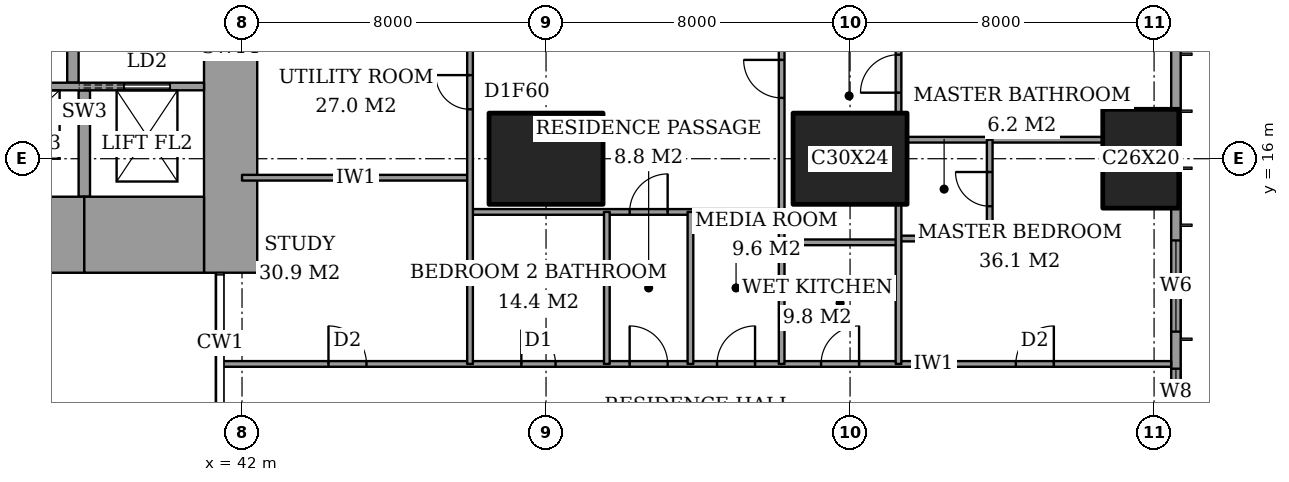
"""IFC4 building model, lengths in metres.
Left out: names, types, materials, properties, quantities, classifications, styles, units other than length and angle.
Written with IfcOpenShell. Run it as: python <this file> out.ifc"""

import sys

from ifc_helpers import new_model, si_unit, direction, frame, frame_2d, origin, origin_2d, place, context, subcontext, project, spatial, rectangle, extrude, element, fill, save


model = new_model("IFC4")
c1 = context("Model", 3, precision=1e-05, world=origin(), true_north=direction((0.0, 1.0)))
c2 = subcontext(c1, "Body", "Model", "MODEL_VIEW")
j1 = project(units=[si_unit("LENGTHUNIT", "METRE"), si_unit("PLANEANGLEUNIT", "RADIAN")], contexts=[c1])
p1 = place(None, origin())
s1 = spatial("IfcSite", under=j1, at=p1, CompositionType="ELEMENT")
p2 = place(p1, origin())
s2 = spatial("IfcBuilding", under=s1, at=p2, CompositionType="ELEMENT")
p3 = place(p2, frame((0.0, 0.0, 40.4)))
s3 = spatial("IfcBuildingStorey", under=s2, at=p3, CompositionType="ELEMENT", Elevation=40.4)
for number, where, z_axis, x_axis in (
    (1, (50.0, 16.0, 0.0), (0.0, 0.0, 1.0), (1.0, 0.0, 0.0)),
    (2, (58.0, 16.0, 0.0), (0.0, 0.0, 1.0), (1.0, 0.0, 0.0)),
):
    element("IfcColumn", number, at=place(p3, frame(where, z_axis=z_axis, x_axis=x_axis)), inside=s3, PredefinedType="COLUMN", context=c2, shape_type="SweptSolid", body=[
        extrude(rectangle(XDim=3.0, YDim=2.4, at=origin_2d()), origin(), (0.0, 0.0, 1.0), 3.6),
    ])
p4 = place(p3, frame((65.65, 16.0, 0.0), z_axis=(0.0, 0.0, 1.0), x_axis=(0.0, 1.0, 0.0)))
e3 = element("IfcColumn", 3, at=p4, inside=s3, PredefinedType="COLUMN", context=c2, shape_type="SweptSolid", body=[
    extrude(rectangle(XDim=2.6, YDim=2.0, at=origin_2d()), origin(), (0.0, 0.0, 1.0), 3.6),
])
p5 = place(p3, frame((28.15, 14.0, 0.0), z_axis=(0.0, 0.0, 1.0), x_axis=(1.0, 0.0, 0.0)))
e4 = element("IfcWall", 4, at=p5, inside=s3, PredefinedType="SHEAR", context=c2, shape_type="SweptSolid", body=[
    extrude(rectangle(XDim=9.7, YDim=2.0, at=frame_2d((4.85, 0.0))), origin(), (0.0, 0.0, 1.0), 3.6),
])
p6 = place(p3, frame((37.85, 14.0, 0.0), z_axis=(0.0, 0.0, 1.0), x_axis=(1.0, 0.0, 0.0)))
e5 = element("IfcWall", 5, at=p6, inside=s3, PredefinedType="SHEAR", context=c2, shape_type="SweptSolid", body=[
    extrude(rectangle(XDim=3.15, YDim=2.0, at=frame_2d((1.575, 0.0))), origin(), (0.0, 0.0, 1.0), 3.6),
])
p7 = place(p3, frame((41.7, 13.0, 0.0), z_axis=(0.0, 0.0, 1.0), x_axis=(0.0, 1.0, 0.0)))
e6 = element("IfcWall", 6, at=p7, inside=s3, PredefinedType="SHEAR", context=c2, shape_type="SweptSolid", body=[
    extrude(rectangle(XDim=11.85, YDim=1.4, at=frame_2d((5.925, 0.0))), origin(), (0.0, 0.0, 1.0), 3.6),
])
p8 = place(p7, frame((7.5, 0.0, 0.0)))
e7 = element("IfcOpeningElement", 7, at=p8, cuts=e6, PredefinedType="OPENING", context=c2, shape_type="SweptSolid", body=[
    extrude(rectangle(XDim=1.8, YDim=2.4, at=frame_2d((0.9, 1.2))), frame((0.0, 0.71, 0.0), z_axis=(0.0, -1.0, 0.0), x_axis=(1.0, 0.0, 0.0)), (0.0, 0.0, 1.0), 1.42),
])
p9 = place(p3, frame((37.55, 18.0, 0.0), z_axis=(0.0, 0.0, 1.0), x_axis=(0.0, 1.0, 0.0)))
e8 = element("IfcWall", 8, at=p9, inside=s3, PredefinedType="PARTITIONING", context=c2, shape_type="SweptSolid", body=[
    extrude(rectangle(XDim=6.7, YDim=0.3, at=frame_2d((3.35, 0.0))), origin(), (0.0, 0.0, 1.0), 3.6),
])
p10 = place(p9, frame((2.8, 0.0, 0.0)))
e9 = element("IfcOpeningElement", 9, at=p10, cuts=e8, PredefinedType="OPENING", context=c2, shape_type="SweptSolid", body=[
    extrude(rectangle(XDim=1.2, YDim=2.1, at=frame_2d((0.6, 1.05))), frame((0.0, 0.16, 0.0), z_axis=(0.0, -1.0, 0.0), x_axis=(1.0, 0.0, 0.0)), (0.0, 0.0, 1.0), 0.32),
])
p11 = place(p3, frame((66.575, 3.175, 0.0), z_axis=(0.0, 0.0, 1.0), x_axis=(0.0, 1.0, 0.0)))
e10 = element("IfcWall", 10, at=p11, inside=s3, PredefinedType="SOLIDWALL", context=c2, shape_type="SweptSolid", body=[
    extrude(rectangle(XDim=41.65, YDim=0.25, at=frame_2d((20.825, 0.0))), origin(), (0.0, 0.0, 1.0), 3.6),
])
p12 = place(p11, frame((0.775, 0.0, 0.6)))
e11 = element("IfcOpeningElement", 11, at=p12, cuts=e10, PredefinedType="OPENING", context=c2, shape_type="SweptSolid", body=[
    extrude(rectangle(XDim=2.4, YDim=2.0, at=frame_2d((1.2, 1.0))), frame((0.0, 0.135, 0.0), z_axis=(0.0, -1.0, 0.0), x_axis=(1.0, 0.0, 0.0)), (0.0, 0.0, 1.0), 0.27),
])
p13 = place(p11, frame((6.1, 0.0, 0.6)))
e12 = element("IfcOpeningElement", 12, at=p13, cuts=e10, PredefinedType="OPENING", context=c2, shape_type="SweptSolid", body=[
    extrude(rectangle(XDim=1.2, YDim=2.0, at=frame_2d((0.6, 1.0))), frame((0.0, 0.135, 0.0), z_axis=(0.0, -1.0, 0.0), x_axis=(1.0, 0.0, 0.0)), (0.0, 0.0, 1.0), 0.27),
])
p14 = place(p11, frame((8.275, 0.0, 0.6)))
e13 = element("IfcOpeningElement", 13, at=p14, cuts=e10, PredefinedType="OPENING", context=c2, shape_type="SweptSolid", body=[
    extrude(rectangle(XDim=2.4, YDim=2.0, at=frame_2d((1.2, 1.0))), frame((0.0, 0.135, 0.0), z_axis=(0.0, -1.0, 0.0), x_axis=(1.0, 0.0, 0.0)), (0.0, 0.0, 1.0), 0.27),
])
p15 = place(p11, frame((15.775, 0.0, 0.6)))
e14 = element("IfcOpeningElement", 14, at=p15, cuts=e10, PredefinedType="OPENING", context=c2, shape_type="SweptSolid", body=[
    extrude(rectangle(XDim=2.4, YDim=2.0, at=frame_2d((1.2, 1.0))), frame((0.0, 0.135, 0.0), z_axis=(0.0, -1.0, 0.0), x_axis=(1.0, 0.0, 0.0)), (0.0, 0.0, 1.0), 0.27),
])
p16 = place(p11, frame((23.475, 0.0, 0.6)))
e15 = element("IfcOpeningElement", 15, at=p16, cuts=e10, PredefinedType="OPENING", context=c2, shape_type="SweptSolid", body=[
    extrude(rectangle(XDim=2.4, YDim=2.0, at=frame_2d((1.2, 1.0))), frame((0.0, 0.135, 0.0), z_axis=(0.0, -1.0, 0.0), x_axis=(1.0, 0.0, 0.0)), (0.0, 0.0, 1.0), 0.27),
])
p17 = place(p11, frame((30.975, 0.0, 0.6)))
e16 = element("IfcOpeningElement", 16, at=p17, cuts=e10, PredefinedType="OPENING", context=c2, shape_type="SweptSolid", body=[
    extrude(rectangle(XDim=2.4, YDim=2.0, at=frame_2d((1.2, 1.0))), frame((0.0, 0.135, 0.0), z_axis=(0.0, -1.0, 0.0), x_axis=(1.0, 0.0, 0.0)), (0.0, 0.0, 1.0), 0.27),
])
p18 = place(p11, frame((34.5, 0.0, 0.6)))
e17 = element("IfcOpeningElement", 17, at=p18, cuts=e10, PredefinedType="OPENING", context=c2, shape_type="SweptSolid", body=[
    extrude(rectangle(XDim=1.2, YDim=2.0, at=frame_2d((0.6, 1.0))), frame((0.0, 0.135, 0.0), z_axis=(0.0, -1.0, 0.0), x_axis=(1.0, 0.0, 0.0)), (0.0, 0.0, 1.0), 0.27),
])
p19 = place(p11, frame((38.475, 0.0, 0.6)))
e18 = element("IfcOpeningElement", 18, at=p19, cuts=e10, PredefinedType="OPENING", context=c2, shape_type="SweptSolid", body=[
    extrude(rectangle(XDim=2.4, YDim=2.0, at=frame_2d((1.2, 1.0))), frame((0.0, 0.135, 0.0), z_axis=(0.0, -1.0, 0.0), x_axis=(1.0, 0.0, 0.0)), (0.0, 0.0, 1.0), 0.27),
])
p20 = place(p3, frame((41.439, 10.6, 0.0), z_axis=(0.0, 0.0, 1.0), x_axis=(1.0, 0.0, 0.0)))
e19 = element("IfcWall", 19, at=p20, inside=s3, PredefinedType="PARTITIONING", context=c2, shape_type="SweptSolid", body=[
    extrude(rectangle(XDim=25.011, YDim=0.15, at=frame_2d((12.505, 0.0))), origin(), (0.0, 0.0, 1.0), 3.35),
])
p21 = place(p20, frame((10.761, 0.0, 0.0)))
e20 = element("IfcOpeningElement", 20, at=p21, cuts=e19, PredefinedType="OPENING", context=c2, shape_type="SweptSolid", body=[
    extrude(rectangle(XDim=1.0, YDim=2.1, at=frame_2d((0.5, 1.05))), frame((0.0, 0.085, 0.0), z_axis=(0.0, -1.0, 0.0), x_axis=(1.0, 0.0, 0.0)), (0.0, 0.0, 1.0), 0.17),
])
p22 = place(p20, frame((20.924, 0.0, 0.0)))
e21 = element("IfcOpeningElement", 21, at=p22, cuts=e19, PredefinedType="OPENING", context=c2, shape_type="SweptSolid", body=[
    extrude(rectangle(XDim=1.0, YDim=2.1, at=frame_2d((0.5, 1.05))), frame((0.0, 0.085, 0.0), z_axis=(0.0, -1.0, 0.0), x_axis=(1.0, 0.0, 0.0)), (0.0, 0.0, 1.0), 0.17),
])
p23 = place(p20, frame((15.799, 0.0, 0.0)))
e22 = element("IfcOpeningElement", 22, at=p23, cuts=e19, PredefinedType="OPENING", context=c2, shape_type="SweptSolid", body=[
    extrude(rectangle(XDim=1.0, YDim=2.1, at=frame_2d((0.5, 1.05))), frame((0.0, 0.085, 0.0), z_axis=(0.0, -1.0, 0.0), x_axis=(1.0, 0.0, 0.0)), (0.0, 0.0, 1.0), 0.17),
])
p24 = place(p20, frame((13.061, 0.0, 0.0)))
e23 = element("IfcOpeningElement", 23, at=p24, cuts=e19, PredefinedType="OPENING", context=c2, shape_type="SweptSolid", body=[
    extrude(rectangle(XDim=1.0, YDim=2.1, at=frame_2d((0.5, 1.05))), frame((0.0, 0.085, 0.0), z_axis=(0.0, -1.0, 0.0), x_axis=(1.0, 0.0, 0.0)), (0.0, 0.0, 1.0), 0.17),
])
p25 = place(p20, frame((7.911, 0.0, 0.0)))
e24 = element("IfcOpeningElement", 24, at=p25, cuts=e19, PredefinedType="OPENING", context=c2, shape_type="SweptSolid", body=[
    extrude(rectangle(XDim=0.9, YDim=2.1, at=frame_2d((0.45, 1.05))), frame((0.0, 0.085, 0.0), z_axis=(0.0, -1.0, 0.0), x_axis=(1.0, 0.0, 0.0)), (0.0, 0.0, 1.0), 0.17),
])
p26 = place(p20, frame((2.836, 0.0, 0.0)))
e25 = element("IfcOpeningElement", 25, at=p26, cuts=e19, PredefinedType="OPENING", context=c2, shape_type="SweptSolid", body=[
    extrude(rectangle(XDim=1.0, YDim=2.1, at=frame_2d((0.5, 1.05))), frame((0.0, 0.085, 0.0), z_axis=(0.0, -1.0, 0.0), x_axis=(1.0, 0.0, 0.0)), (0.0, 0.0, 1.0), 0.17),
])
p27 = place(p3, frame((56.2, 13.8, 0.0), z_axis=(0.0, 0.0, 1.0), x_axis=(1.0, 0.0, 0.0)))
e26 = element("IfcWall", 26, at=p27, inside=s3, PredefinedType="PARTITIONING", context=c2, shape_type="SweptSolid", body=[
    extrude(rectangle(XDim=3.075, YDim=0.15, at=frame_2d((1.538, 0.0))), origin(), (0.0, 0.0, 1.0), 3.35),
])
p28 = place(p3, frame((59.275, 13.9, 0.0), z_axis=(0.0, 0.0, 1.0), x_axis=(1.0, 0.0, 0.0)))
e27 = element("IfcWall", 27, at=p28, inside=s3, PredefinedType="PARTITIONING", context=c2, shape_type="SweptSolid", body=[
    extrude(rectangle(XDim=2.4, YDim=0.15, at=frame_2d((1.2, 0.0))), origin(), (0.0, 0.0, 1.0), 3.35),
])
p29 = place(p3, frame((48.0, 14.6, 0.0), z_axis=(0.0, 0.0, 1.0), x_axis=(1.0, 0.0, 0.0)))
e28 = element("IfcWall", 28, at=p29, inside=s3, PredefinedType="PARTITIONING", context=c2, shape_type="SweptSolid", body=[
    extrude(rectangle(XDim=8.2, YDim=0.15, at=frame_2d((4.1, 0.0))), origin(), (0.0, 0.0, 1.0), 3.35),
])
p30 = place(p29, frame((4.2, 0.0, 0.0)))
e29 = element("IfcOpeningElement", 29, at=p30, cuts=e28, PredefinedType="OPENING", context=c2, shape_type="SweptSolid", body=[
    extrude(rectangle(XDim=1.0, YDim=2.1, at=frame_2d((0.5, 1.05))), frame((0.0, 0.085, 0.0), z_axis=(0.0, -1.0, 0.0), x_axis=(1.0, 0.0, 0.0)), (0.0, 0.0, 1.0), 0.17),
])
p31 = place(p3, frame((42.0, 15.5, 0.0), z_axis=(0.0, 0.0, 1.0), x_axis=(1.0, 0.0, 0.0)))
e30 = element("IfcWall", 30, at=p31, inside=s3, PredefinedType="PARTITIONING", context=c2, shape_type="SweptSolid", body=[
    extrude(rectangle(XDim=6.0, YDim=0.15, at=frame_2d((3.0, 0.0))), origin(), (0.0, 0.0, 1.0), 3.35),
])
p32 = place(p3, frame((59.5, 16.5, 0.0), z_axis=(0.0, 0.0, 1.0), x_axis=(1.0, 0.0, 0.0)))
e31 = element("IfcWall", 31, at=p32, inside=s3, PredefinedType="PARTITIONING", context=c2, shape_type="SweptSolid", body=[
    extrude(rectangle(XDim=5.15, YDim=0.15, at=frame_2d((2.575, 0.0))), origin(), (0.0, 0.0, 1.0), 3.35),
])
p33 = place(p3, frame((48.0, 10.6, 0.0), z_axis=(0.0, 0.0, 1.0), x_axis=(0.0, 1.0, 0.0)))
e32 = element("IfcWall", 32, at=p33, inside=s3, PredefinedType="PARTITIONING", context=c2, shape_type="SweptSolid", body=[
    extrude(rectangle(XDim=13.4, YDim=0.15, at=frame_2d((6.7, 0.0))), origin(), (0.0, 0.0, 1.0), 3.35),
])
p34 = place(p33, frame((10.8, 0.0, 0.0)))
e33 = element("IfcOpeningElement", 33, at=p34, cuts=e32, PredefinedType="OPENING", context=c2, shape_type="SweptSolid", body=[
    extrude(rectangle(XDim=1.2, YDim=2.4, at=frame_2d((0.6, 1.2))), frame((0.0, 0.085, 0.0), z_axis=(0.0, -1.0, 0.0), x_axis=(1.0, 0.0, 0.0)), (0.0, 0.0, 1.0), 0.17),
])
p35 = place(p33, frame((6.7, 0.0, 0.0)))
e34 = element("IfcOpeningElement", 34, at=p35, cuts=e32, PredefinedType="OPENING", context=c2, shape_type="SweptSolid", body=[
    extrude(rectangle(XDim=0.9, YDim=2.1, at=frame_2d((0.45, 1.05))), frame((0.0, 0.085, 0.0), z_axis=(0.0, -1.0, 0.0), x_axis=(1.0, 0.0, 0.0)), (0.0, 0.0, 1.0), 0.17),
])
for number, where, z_axis, x_axis in (
    (35, (51.6, 10.6, 0.0), (0.0, 0.0, 1.0), (0.0, 1.0, 0.0)),
    (36, (53.8, 10.6, 0.0), (0.0, 0.0, 1.0), (0.0, 1.0, 0.0)),
):
    element("IfcWall", number, at=place(p3, frame(where, z_axis=z_axis, x_axis=x_axis)), inside=s3, PredefinedType="PARTITIONING", context=c2, shape_type="SweptSolid", body=[
        extrude(rectangle(XDim=4.0, YDim=0.15, at=frame_2d((2.0, 0.0))), origin(), (0.0, 0.0, 1.0), 3.35),
    ])
p36 = place(p3, frame((56.2, 10.6, 0.0), z_axis=(0.0, 0.0, 1.0), x_axis=(0.0, 1.0, 0.0)))
e37 = element("IfcWall", 37, at=p36, inside=s3, PredefinedType="PARTITIONING", context=c2, shape_type="SweptSolid", body=[
    extrude(rectangle(XDim=11.0, YDim=0.15, at=frame_2d((5.5, 0.0))), origin(), (0.0, 0.0, 1.0), 3.35),
])
p37 = place(p36, frame((7.0, 0.0, 0.0)))
e38 = element("IfcOpeningElement", 38, at=p37, cuts=e37, PredefinedType="OPENING", context=c2, shape_type="SweptSolid", body=[
    extrude(rectangle(XDim=1.0, YDim=2.1, at=frame_2d((0.5, 1.05))), frame((0.0, 0.085, 0.0), z_axis=(0.0, -1.0, 0.0), x_axis=(1.0, 0.0, 0.0)), (0.0, 0.0, 1.0), 0.17),
])
p38 = place(p3, frame((59.275, 10.6, 0.0), z_axis=(0.0, 0.0, 1.0), x_axis=(0.0, 1.0, 0.0)))
e39 = element("IfcWall", 39, at=p38, inside=s3, PredefinedType="PARTITIONING", context=c2, shape_type="SweptSolid", body=[
    extrude(rectangle(XDim=4.2, YDim=0.15, at=frame_2d((2.1, 0.0))), origin(), (0.0, 0.0, 1.0), 3.35),
])
p39 = place(p3, frame((59.275, 17.2, 0.0), z_axis=(0.0, 0.0, 1.0), x_axis=(0.0, 1.0, 0.0)))
e40 = element("IfcWall", 40, at=p39, inside=s3, PredefinedType="PARTITIONING", context=c2, shape_type="SweptSolid", body=[
    extrude(rectangle(XDim=2.45, YDim=0.15, at=frame_2d((1.225, 0.0))), origin(), (0.0, 0.0, 1.0), 3.35),
])
p40 = place(p39, frame((0.538, 0.0, 0.0)))
e41 = element("IfcOpeningElement", 41, at=p40, cuts=e40, PredefinedType="OPENING", context=c2, shape_type="SweptSolid", body=[
    extrude(rectangle(XDim=1.0, YDim=2.1, at=frame_2d((0.5, 1.05))), frame((0.0, 0.085, 0.0), z_axis=(0.0, -1.0, 0.0), x_axis=(1.0, 0.0, 0.0)), (0.0, 0.0, 1.0), 0.17),
])
p41 = place(p3, frame((61.675, 13.9, 0.0), z_axis=(0.0, 0.0, 1.0), x_axis=(0.0, 1.0, 0.0)))
e42 = element("IfcWall", 42, at=p41, inside=s3, PredefinedType="PARTITIONING", context=c2, shape_type="SweptSolid", body=[
    extrude(rectangle(XDim=2.6, YDim=0.15, at=frame_2d((1.3, 0.0))), origin(), (0.0, 0.0, 1.0), 3.35),
])
p42 = place(p41, frame((0.85, 0.0, 0.0)))
e43 = element("IfcOpeningElement", 43, at=p42, cuts=e42, PredefinedType="OPENING", context=c2, shape_type="SweptSolid", body=[
    extrude(rectangle(XDim=0.9, YDim=2.1, at=frame_2d((0.45, 1.05))), frame((0.0, 0.085, 0.0), z_axis=(0.0, -1.0, 0.0), x_axis=(1.0, 0.0, 0.0)), (0.0, 0.0, 1.0), 0.17),
])
p43 = place(p3, frame((28.3, 17.9, 0.0), z_axis=(0.0, 0.0, 1.0), x_axis=(1.0, 0.0, 0.0)))
e44 = element("IfcWall", 44, at=p43, inside=s3, PredefinedType="PARTITIONING", context=c2, shape_type="SweptSolid", body=[
    extrude(rectangle(XDim=12.7, YDim=0.2, at=frame_2d((6.35, 0.0))), origin(), (0.0, 0.0, 1.0), 3.6),
])
p44 = place(p43, frame((0.95, 0.0, 0.0)))
e45 = element("IfcOpeningElement", 45, at=p44, cuts=e44, PredefinedType="OPENING", context=c2, shape_type="SweptSolid", body=[
    extrude(rectangle(XDim=1.1, YDim=2.1, at=frame_2d((0.55, 1.05))), frame((0.0, 0.11, 0.0), z_axis=(0.0, -1.0, 0.0), x_axis=(1.0, 0.0, 0.0)), (0.0, 0.0, 1.0), 0.22),
])
p45 = place(p43, frame((4.15, 0.0, 0.0)))
e46 = element("IfcOpeningElement", 46, at=p45, cuts=e44, PredefinedType="OPENING", context=c2, shape_type="SweptSolid", body=[
    extrude(rectangle(XDim=1.1, YDim=2.1, at=frame_2d((0.55, 1.05))), frame((0.0, 0.11, 0.0), z_axis=(0.0, -1.0, 0.0), x_axis=(1.0, 0.0, 0.0)), (0.0, 0.0, 1.0), 0.22),
])
p46 = place(p43, frame((7.35, 0.0, 0.0)))
e47 = element("IfcOpeningElement", 47, at=p46, cuts=e44, PredefinedType="OPENING", context=c2, shape_type="SweptSolid", body=[
    extrude(rectangle(XDim=1.1, YDim=2.1, at=frame_2d((0.55, 1.05))), frame((0.0, 0.11, 0.0), z_axis=(0.0, -1.0, 0.0), x_axis=(1.0, 0.0, 0.0)), (0.0, 0.0, 1.0), 0.22),
])
p47 = place(p43, frame((10.6, 0.0, 0.0)))
e48 = element("IfcOpeningElement", 48, at=p47, cuts=e44, PredefinedType="OPENING", context=c2, shape_type="SweptSolid", body=[
    extrude(rectangle(XDim=1.2, YDim=2.1, at=frame_2d((0.6, 1.05))), frame((0.0, 0.11, 0.0), z_axis=(0.0, -1.0, 0.0), x_axis=(1.0, 0.0, 0.0)), (0.0, 0.0, 1.0), 0.22),
])
p48 = place(p3, frame((37.85, 15.0, 0.0), z_axis=(0.0, 0.0, 1.0), x_axis=(0.0, 1.0, 0.0)))
e49 = element("IfcWall", 49, at=p48, inside=s3, PredefinedType="SHEAR", context=c2, shape_type="SweptSolid", body=[
    extrude(rectangle(XDim=2.8, YDim=0.3, at=frame_2d((1.4, 0.0))), origin(), (0.0, 0.0, 1.0), 3.6),
])
p49 = place(p13, origin())
e50 = element("IfcWindow", 50, at=p49, inside=s3, PartitioningType="SINGLE_PANEL", PredefinedType="WINDOW", context=c2, shape_type="SweptSolid", body=[
    extrude(rectangle(XDim=1.2, YDim=2.0, at=frame_2d((0.6, 1.0))), frame((0.0, 0.03, 0.0), z_axis=(0.0, -1.0, 0.0), x_axis=(1.0, 0.0, 0.0)), (0.0, 0.0, 1.0), 0.06),
])
fill(e12, e50)
p50 = place(p14, origin())
e51 = element("IfcWindow", 51, at=p50, inside=s3, PartitioningType="SINGLE_PANEL", PredefinedType="WINDOW", context=c2, shape_type="SweptSolid", body=[
    extrude(rectangle(XDim=2.4, YDim=2.0, at=frame_2d((1.2, 1.0))), frame((0.0, 0.03, 0.0), z_axis=(0.0, -1.0, 0.0), x_axis=(1.0, 0.0, 0.0)), (0.0, 0.0, 1.0), 0.06),
])
fill(e13, e51)
p51 = place(p21, origin())
e52 = element("IfcDoor", 52, at=p51, inside=s3, OperationType="SINGLE_SWING_RIGHT", PredefinedType="DOOR", context=c2, shape_type="SweptSolid", body=[
    extrude(rectangle(XDim=1.0, YDim=2.1, at=frame_2d((0.5, 1.05))), frame((0.0, 0.025, 0.0), z_axis=(0.0, -1.0, 0.0), x_axis=(1.0, 0.0, 0.0)), (0.0, 0.0, 1.0), 0.05),
])
fill(e20, e52)
p52 = place(p42, origin())
e53 = element("IfcDoor", 53, at=p52, inside=s3, OperationType="SINGLE_SWING_LEFT", PredefinedType="DOOR", context=c2, shape_type="SweptSolid", body=[
    extrude(rectangle(XDim=0.9, YDim=2.1, at=frame_2d((0.45, 1.05))), frame((0.0, 0.025, 0.0), z_axis=(0.0, -1.0, 0.0), x_axis=(1.0, 0.0, 0.0)), (0.0, 0.0, 1.0), 0.05),
])
fill(e43, e53)
p53 = place(p22, origin())
e54 = element("IfcDoor", 54, at=p53, inside=s3, OperationType="SINGLE_SWING_LEFT", PredefinedType="DOOR", context=c2, shape_type="SweptSolid", body=[
    extrude(rectangle(XDim=1.0, YDim=2.1, at=frame_2d((0.5, 1.05))), frame((0.0, 0.025, 0.0), z_axis=(0.0, -1.0, 0.0), x_axis=(1.0, 0.0, 0.0)), (0.0, 0.0, 1.0), 0.05),
])
fill(e21, e54)
p54 = place(p40, origin())
e55 = element("IfcDoor", 55, at=p54, inside=s3, OperationType="SINGLE_SWING_RIGHT", PredefinedType="DOOR", context=c2, shape_type="SweptSolid", body=[
    extrude(rectangle(XDim=1.0, YDim=2.1, at=frame_2d((0.5, 1.05))), frame((0.0, 0.025, 0.0), z_axis=(0.0, -1.0, 0.0), x_axis=(1.0, 0.0, 0.0)), (0.0, 0.0, 1.0), 0.05),
])
fill(e41, e55)
p55 = place(p23, origin())
e56 = element("IfcDoor", 56, at=p55, inside=s3, OperationType="SINGLE_SWING_LEFT", PredefinedType="DOOR", context=c2, shape_type="SweptSolid", body=[
    extrude(rectangle(XDim=1.0, YDim=2.1, at=frame_2d((0.5, 1.05))), frame((0.0, 0.025, 0.0), z_axis=(0.0, -1.0, 0.0), x_axis=(1.0, 0.0, 0.0)), (0.0, 0.0, 1.0), 0.05),
])
fill(e22, e56)
p56 = place(p37, origin())
e57 = element("IfcDoor", 57, at=p56, inside=s3, OperationType="SINGLE_SWING_LEFT", PredefinedType="DOOR", context=c2, shape_type="SweptSolid", body=[
    extrude(rectangle(XDim=1.0, YDim=2.1, at=frame_2d((0.5, 1.05))), frame((0.0, 0.025, 0.0), z_axis=(0.0, -1.0, 0.0), x_axis=(1.0, 0.0, 0.0)), (0.0, 0.0, 1.0), 0.05),
])
fill(e38, e57)
p57 = place(p24, origin())
e58 = element("IfcDoor", 58, at=p57, inside=s3, OperationType="SINGLE_SWING_LEFT", PredefinedType="DOOR", context=c2, shape_type="SweptSolid", body=[
    extrude(rectangle(XDim=1.0, YDim=2.1, at=frame_2d((0.5, 1.05))), frame((0.0, 0.025, 0.0), z_axis=(0.0, -1.0, 0.0), x_axis=(1.0, 0.0, 0.0)), (0.0, 0.0, 1.0), 0.05),
])
fill(e23, e58)
p58 = place(p30, origin())
e59 = element("IfcDoor", 59, at=p58, inside=s3, OperationType="SINGLE_SWING_LEFT", PredefinedType="DOOR", context=c2, shape_type="SweptSolid", body=[
    extrude(rectangle(XDim=1.0, YDim=2.1, at=frame_2d((0.5, 1.05))), frame((0.0, 0.025, 0.0), z_axis=(0.0, -1.0, 0.0), x_axis=(1.0, 0.0, 0.0)), (0.0, 0.0, 1.0), 0.05),
])
fill(e29, e59)
p59 = place(p25, origin())
e60 = element("IfcDoor", 60, at=p59, inside=s3, OperationType="SINGLE_SWING_RIGHT", PredefinedType="DOOR", context=c2, shape_type="SweptSolid", body=[
    extrude(rectangle(XDim=0.9, YDim=2.1, at=frame_2d((0.45, 1.05))), frame((0.0, 0.025, 0.0), z_axis=(0.0, -1.0, 0.0), x_axis=(1.0, 0.0, 0.0)), (0.0, 0.0, 1.0), 0.05),
])
fill(e24, e60)
p60 = place(p26, origin())
e61 = element("IfcDoor", 61, at=p60, inside=s3, OperationType="SINGLE_SWING_RIGHT", PredefinedType="DOOR", context=c2, shape_type="SweptSolid", body=[
    extrude(rectangle(XDim=1.0, YDim=2.1, at=frame_2d((0.5, 1.05))), frame((0.0, 0.025, 0.0), z_axis=(0.0, -1.0, 0.0), x_axis=(1.0, 0.0, 0.0)), (0.0, 0.0, 1.0), 0.05),
])
fill(e25, e61)
p61 = place(p35, origin())
e62 = element("IfcDoor", 62, at=p61, inside=s3, OperationType="SINGLE_SWING_LEFT", PredefinedType="DOOR", context=c2, shape_type="SweptSolid", body=[
    extrude(rectangle(XDim=0.9, YDim=2.1, at=frame_2d((0.45, 1.05))), frame((0.0, 0.025, 0.0), z_axis=(0.0, -1.0, 0.0), x_axis=(1.0, 0.0, 0.0)), (0.0, 0.0, 1.0), 0.05),
])
fill(e34, e62)
p62 = place(p47, origin())
e63 = element("IfcDoor", 63, at=p62, inside=s3, OperationType="SLIDING_TO_LEFT", PredefinedType="DOOR", context=c2, shape_type="SweptSolid", body=[
    extrude(rectangle(XDim=1.2, YDim=2.1, at=frame_2d((0.6, 1.05))), frame((0.0, 0.025, 0.0), z_axis=(0.0, -1.0, 0.0), x_axis=(1.0, 0.0, 0.0)), (0.0, 0.0, 1.0), 0.05),
])
fill(e48, e63)
save(model, sys.argv[1])
